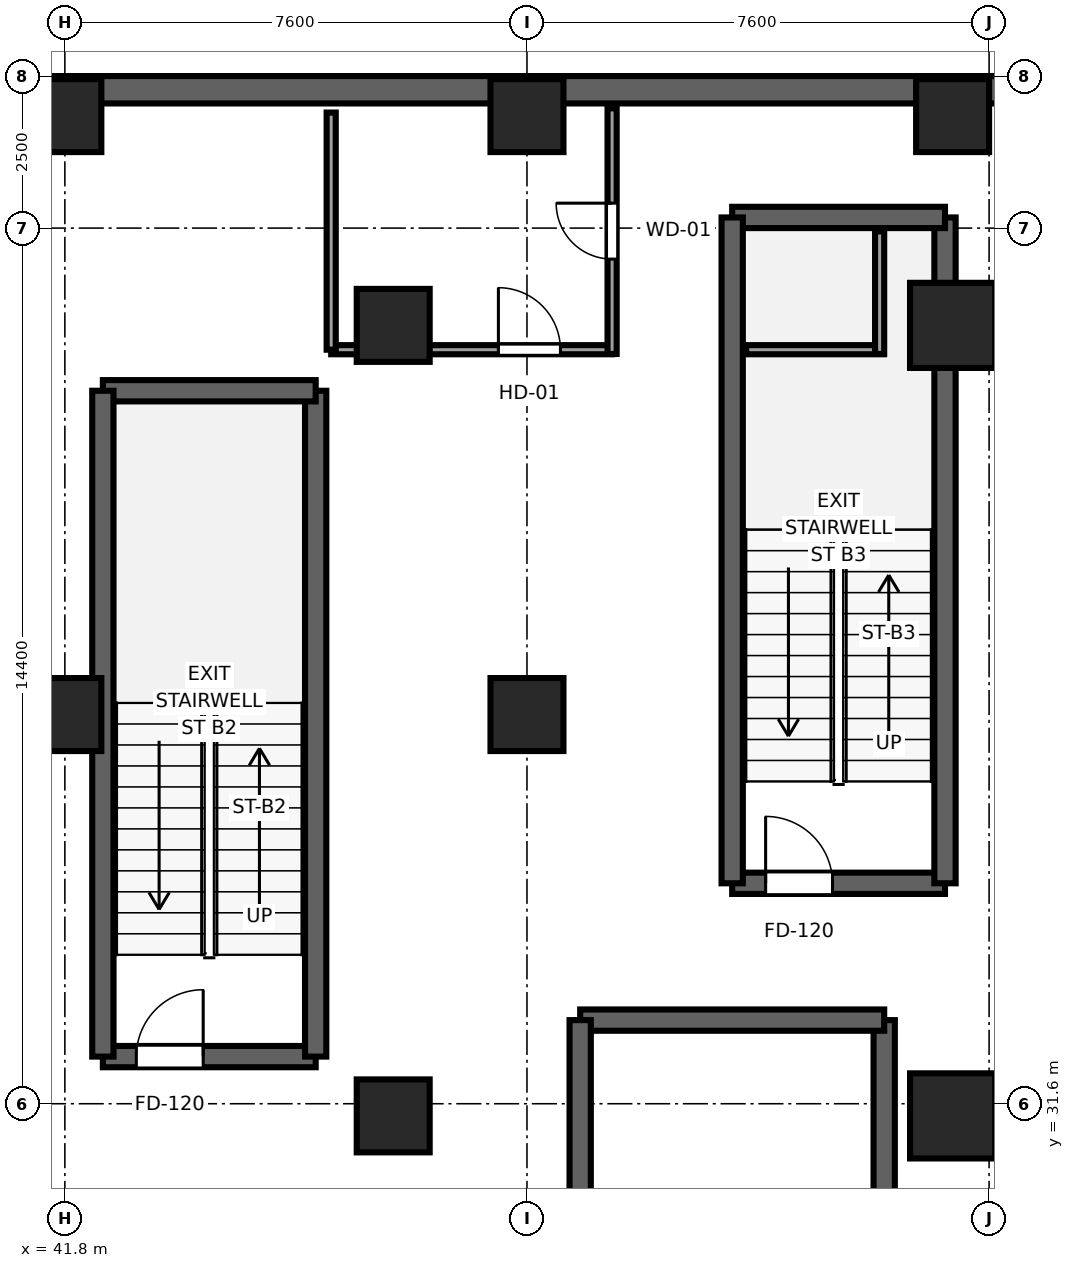
"""IFC4 building model, lengths in metres.
Left out: names, types, materials, properties, quantities, classifications, styles, units other than length and angle.
Written with IfcOpenShell. Run it as: python <this file> out.ifc"""

import sys

from ifc_helpers import new_model, si_unit, direction, frame, frame_2d, origin, origin_2d, place, context, subcontext, project, spatial, rectangle, extrude, source, transform, mapped, element, fill, save


model = new_model("IFC4")
c1 = context("Model", 3, precision=1e-05, world=origin(), true_north=direction((0.0, 1.0)))
c2 = subcontext(c1, "Body", "Model", "MODEL_VIEW")
j1 = project(units=[si_unit("LENGTHUNIT", "METRE"), si_unit("PLANEANGLEUNIT", "RADIAN")], contexts=[c1])
p1 = place(None, origin())
s1 = spatial("IfcSite", under=j1, at=p1, CompositionType="ELEMENT")
p2 = place(p1, origin())
s2 = spatial("IfcBuilding", under=s1, at=p2, CompositionType="ELEMENT")
p3 = place(p2, frame((0.0, 0.0, -4.8)))
s3 = spatial("IfcBuildingStorey", under=s2, at=p3, CompositionType="ELEMENT", Elevation=-4.8)
p4 = place(p3, frame((42.425, 32.375, 0.0), z_axis=(0.0, 0.0, 1.0), x_axis=(1.0, 0.0, 0.0)))
e1 = element("IfcWall", 1, at=p4, inside=s3, PredefinedType="SHEAR", context=c2, shape_type="SweptSolid", body=[
    extrude(rectangle(XDim=3.5, YDim=0.35, at=frame_2d((1.75, 0.0))), origin(), (0.0, 0.0, 1.0), 4.8),
])
p5 = place(p4, frame((0.55, 0.0, 0.0)))
e2 = element("IfcOpeningElement", 2, at=p5, cuts=e1, PredefinedType="OPENING", context=c2, shape_type="SweptSolid", body=[
    extrude(rectangle(XDim=1.1, YDim=2.12, at=frame_2d((0.55, 1.06))), frame((0.0, 0.185, 0.0), z_axis=(0.0, -1.0, 0.0), x_axis=(1.0, 0.0, 0.0)), (0.0, 0.0, 1.0), 0.37),
])
p6 = place(p3, frame((45.925, 32.375, 0.0), z_axis=(0.0, 0.0, 1.0), x_axis=(0.0, 1.0, 0.0)))
e3 = element("IfcWall", 3, at=p6, inside=s3, PredefinedType="SHEAR", context=c2, shape_type="SweptSolid", body=[
    extrude(rectangle(XDim=10.95, YDim=0.35, at=frame_2d((5.475, 0.0))), origin(), (0.0, 0.0, 1.0), 4.8),
])
p7 = place(p3, frame((45.925, 43.325, 0.0), z_axis=(0.0, 0.0, 1.0), x_axis=(-1.0, 0.0, 0.0)))
e4 = element("IfcWall", 4, at=p7, inside=s3, PredefinedType="SHEAR", context=c2, shape_type="SweptSolid", body=[
    extrude(rectangle(XDim=3.5, YDim=0.35, at=frame_2d((1.75, 0.0))), origin(), (0.0, 0.0, 1.0), 4.8),
])
p8 = place(p3, frame((42.425, 43.325, 0.0), z_axis=(0.0, 0.0, 1.0), x_axis=(0.0, -1.0, 0.0)))
e5 = element("IfcWall", 5, at=p8, inside=s3, PredefinedType="SHEAR", context=c2, shape_type="SweptSolid", body=[
    extrude(rectangle(XDim=10.95, YDim=0.35, at=frame_2d((5.475, 0.0))), origin(), (0.0, 0.0, 1.0), 4.8),
])
p9 = place(p3, frame((52.775, 35.225, 0.0), z_axis=(0.0, 0.0, 1.0), x_axis=(1.0, 0.0, 0.0)))
e6 = element("IfcWall", 6, at=p9, inside=s3, PredefinedType="SHEAR", context=c2, shape_type="SweptSolid", body=[
    extrude(rectangle(XDim=3.5, YDim=0.35, at=frame_2d((1.75, 0.0))), origin(), (0.0, 0.0, 1.0), 4.8),
])
p10 = place(p9, frame((0.55, 0.0, 0.0)))
e7 = element("IfcOpeningElement", 7, at=p10, cuts=e6, PredefinedType="OPENING", context=c2, shape_type="SweptSolid", body=[
    extrude(rectangle(XDim=1.1, YDim=2.12, at=frame_2d((0.55, 1.06))), frame((0.0, 0.185, 0.0), z_axis=(0.0, -1.0, 0.0), x_axis=(1.0, 0.0, 0.0)), (0.0, 0.0, 1.0), 0.37),
])
p11 = place(p3, frame((56.275, 35.225, 0.0), z_axis=(0.0, 0.0, 1.0), x_axis=(0.0, 1.0, 0.0)))
e8 = element("IfcWall", 8, at=p11, inside=s3, PredefinedType="SHEAR", context=c2, shape_type="SweptSolid", body=[
    extrude(rectangle(XDim=10.95, YDim=0.35, at=frame_2d((5.475, 0.0))), origin(), (0.0, 0.0, 1.0), 4.8),
])
p12 = place(p3, frame((56.275, 46.175, 0.0), z_axis=(0.0, 0.0, 1.0), x_axis=(-1.0, 0.0, 0.0)))
e9 = element("IfcWall", 9, at=p12, inside=s3, PredefinedType="SHEAR", context=c2, shape_type="SweptSolid", body=[
    extrude(rectangle(XDim=3.5, YDim=0.35, at=frame_2d((1.75, 0.0))), origin(), (0.0, 0.0, 1.0), 4.8),
])
p13 = place(p3, frame((52.775, 46.175, 0.0), z_axis=(0.0, 0.0, 1.0), x_axis=(0.0, -1.0, 0.0)))
e10 = element("IfcWall", 10, at=p13, inside=s3, PredefinedType="SHEAR", context=c2, shape_type="SweptSolid", body=[
    extrude(rectangle(XDim=10.95, YDim=0.35, at=frame_2d((5.475, 0.0))), origin(), (0.0, 0.0, 1.0), 4.8),
])
p14 = place(p3, frame((55.275, 20.025, 0.0), z_axis=(0.0, 0.0, 1.0), x_axis=(0.0, 1.0, 0.0)))
e11 = element("IfcWall", 11, at=p14, inside=s3, PredefinedType="SHEAR", context=c2, shape_type="SweptSolid", body=[
    extrude(rectangle(XDim=12.95, YDim=0.35, at=frame_2d((6.475, 0.0))), origin(), (0.0, 0.0, 1.0), 4.8),
])
p15 = place(p3, frame((55.275, 32.975, 0.0), z_axis=(0.0, 0.0, 1.0), x_axis=(-1.0, 0.0, 0.0)))
e12 = element("IfcWall", 12, at=p15, inside=s3, PredefinedType="SHEAR", context=c2, shape_type="SweptSolid", body=[
    extrude(rectangle(XDim=5.0, YDim=0.35, at=frame_2d((2.5, 0.0))), origin(), (0.0, 0.0, 1.0), 4.8),
])
p16 = place(p3, frame((50.275, 32.975, 0.0), z_axis=(0.0, 0.0, 1.0), x_axis=(0.0, -1.0, 0.0)))
e13 = element("IfcWall", 13, at=p16, inside=s3, PredefinedType="SHEAR", context=c2, shape_type="SweptSolid", body=[
    extrude(rectangle(XDim=12.95, YDim=0.35, at=frame_2d((6.475, 0.0))), origin(), (0.0, 0.0, 1.0), 4.8),
])
p17 = place(p3, frame((-8.4, 48.275, 0.0), z_axis=(0.0, 0.0, 1.0), x_axis=(1.0, 0.0, 0.0)))
e14 = element("IfcWall", 14, at=p17, inside=s3, PredefinedType="SOLIDWALL", context=c2, shape_type="SweptSolid", body=[
    extrude(rectangle(XDim=73.8, YDim=0.45, at=frame_2d((36.9, 0.0))), origin(), (0.0, 0.0, 1.0), 4.8),
])
m1 = source(origin(), c2, "Body", "SweptSolid", [
    extrude(rectangle(XDim=1.2, YDim=1.2, at=origin_2d()), origin(), (0.0, 0.0, 1.0), 4.8),
])
p18 = place(p3, frame((47.2, 31.4, 0.0), z_axis=(0.0, 0.0, 1.0), x_axis=(1.0, 0.0, 0.0)))
e15 = element("IfcColumn", 15, at=p18, inside=s3, PredefinedType="COLUMN", context=c2, shape_type="MappedRepresentation", body=[
    mapped(m1, transform((0.0, 0.0, 0.0), x_axis=(1.0, 0.0, 0.0), y_axis=(0.0, 1.0, 0.0), z_axis=(0.0, 0.0, 1.0), scale=1.0)),
])
m2 = source(origin(), c2, "Body", "SweptSolid", [
    extrude(rectangle(XDim=1.4, YDim=1.4, at=origin_2d()), origin(), (0.0, 0.0, 1.0), 4.8),
])
p19 = place(p3, frame((56.4, 31.4, 0.0), z_axis=(0.0, 0.0, 1.0), x_axis=(1.0, 0.0, 0.0)))
e16 = element("IfcColumn", 16, at=p19, inside=s3, PredefinedType="COLUMN", context=c2, shape_type="MappedRepresentation", body=[
    mapped(m2, transform((0.0, 0.0, 0.0), x_axis=(1.0, 0.0, 0.0), y_axis=(0.0, 1.0, 0.0), z_axis=(0.0, 0.0, 1.0), scale=1.0)),
])
p20 = place(p3, frame((47.2, 44.4, 0.0), z_axis=(0.0, 0.0, 1.0), x_axis=(1.0, 0.0, 0.0)))
e17 = element("IfcColumn", 17, at=p20, inside=s3, PredefinedType="COLUMN", context=c2, shape_type="MappedRepresentation", body=[
    mapped(m1, transform((0.0, 0.0, 0.0), x_axis=(1.0, 0.0, 0.0), y_axis=(0.0, 1.0, 0.0), z_axis=(0.0, 0.0, 1.0), scale=1.0)),
])
p21 = place(p3, frame((56.4, 44.4, 0.0), z_axis=(0.0, 0.0, 1.0), x_axis=(1.0, 0.0, 0.0)))
e18 = element("IfcColumn", 18, at=p21, inside=s3, PredefinedType="COLUMN", context=c2, shape_type="MappedRepresentation", body=[
    mapped(m2, transform((0.0, 0.0, 0.0), x_axis=(1.0, 0.0, 0.0), y_axis=(0.0, 1.0, 0.0), z_axis=(0.0, 0.0, 1.0), scale=1.0)),
])
for number, where, z_axis, x_axis in (
    (19, (41.8, 47.85, 0.0), (0.0, 0.0, 1.0), (1.0, 0.0, 0.0)),
    (20, (49.4, 47.85, 0.0), (0.0, 0.0, 1.0), (1.0, 0.0, 0.0)),
    (21, (56.4, 47.85, 0.0), (0.0, 0.0, 1.0), (1.0, 0.0, 0.0)),
    (22, (41.8, 38.0, 0.0), (0.0, 0.0, 1.0), (1.0, 0.0, 0.0)),
    (23, (49.4, 38.0, 0.0), (0.0, 0.0, 1.0), (1.0, 0.0, 0.0)),
):
    element("IfcColumn", number, at=place(p3, frame(where, z_axis=z_axis, x_axis=x_axis)), inside=s3, PredefinedType="COLUMN", context=c2, shape_type="MappedRepresentation", body=[
        mapped(m1, transform((0.0, 0.0, 0.0), x_axis=(1.0, 0.0, 0.0), y_axis=(0.0, 1.0, 0.0), z_axis=(0.0, 0.0, 1.0), scale=1.0)),
    ])
p22 = place(p3, frame((46.18, 44.0, 0.0), z_axis=(0.0, 0.0, 1.0), x_axis=(1.0, 0.0, 0.0)))
e24 = element("IfcWall", 24, at=p22, inside=s3, PredefinedType="PARTITIONING", context=c2, shape_type="SweptSolid", body=[
    extrude(rectangle(XDim=4.62, YDim=0.15, at=frame_2d((2.31, 0.0))), origin(), (0.0, 0.0, 1.0), 4.54),
])
p23 = place(p22, frame((2.75, 0.0, 0.0)))
e25 = element("IfcOpeningElement", 25, at=p23, cuts=e24, PredefinedType="OPENING", context=c2, shape_type="SweptSolid", body=[
    extrude(rectangle(XDim=1.02, YDim=2.03, at=frame_2d((0.51, 1.015))), frame((0.0, 0.085, 0.0), z_axis=(0.0, -1.0, 0.0), x_axis=(1.0, 0.0, 0.0)), (0.0, 0.0, 1.0), 0.17),
])
p24 = place(p3, frame((46.18, 44.0, 0.0), z_axis=(0.0, 0.0, 1.0), x_axis=(0.0, 1.0, 0.0)))
e26 = element("IfcWall", 26, at=p24, inside=s3, PredefinedType="PARTITIONING", context=c2, shape_type="SweptSolid", body=[
    extrude(rectangle(XDim=3.9, YDim=0.15, at=frame_2d((1.95, 0.0))), origin(), (0.0, 0.0, 1.0), 4.54),
])
p25 = place(p3, frame((50.8, 43.93, 0.0), z_axis=(0.0, 0.0, 1.0), x_axis=(0.0, 1.0, 0.0)))
e27 = element("IfcWall", 27, at=p25, inside=s3, PredefinedType="PARTITIONING", context=c2, shape_type="SweptSolid", body=[
    extrude(rectangle(XDim=4.04, YDim=0.15, at=frame_2d((2.02, 0.0))), origin(), (0.0, 0.0, 1.0), 4.54),
])
p26 = place(p25, frame((1.56, 0.0, 0.0)))
e28 = element("IfcOpeningElement", 28, at=p26, cuts=e27, PredefinedType="OPENING", context=c2, shape_type="SweptSolid", body=[
    extrude(rectangle(XDim=0.92, YDim=2.01, at=frame_2d((0.46, 1.005))), frame((0.0, 0.085, 0.0), z_axis=(0.0, -1.0, 0.0), x_axis=(1.0, 0.0, 0.0)), (0.0, 0.0, 1.0), 0.17),
])
p27 = place(p3, frame((53.005, 44.0, 0.0), z_axis=(0.0, 0.0, 1.0), x_axis=(1.0, 0.0, 0.0)))
e29 = element("IfcWall", 29, at=p27, inside=s3, PredefinedType="PARTITIONING", context=c2, shape_type="SweptSolid", body=[
    extrude(rectangle(XDim=2.265, YDim=0.15, at=frame_2d((1.133, 0.0))), origin(), (0.0, 0.0, 1.0), 4.54),
])
p28 = place(p3, frame((55.2, 43.93, 0.0), z_axis=(0.0, 0.0, 1.0), x_axis=(0.0, 1.0, 0.0)))
e30 = element("IfcWall", 30, at=p28, inside=s3, PredefinedType="PARTITIONING", context=c2, shape_type="SweptSolid", body=[
    extrude(rectangle(XDim=2.015, YDim=0.15, at=frame_2d((1.008, 0.0))), origin(), (0.0, 0.0, 1.0), 4.54),
])
m3 = source(origin(), c2, "Body", "SweptSolid", [
    extrude(rectangle(XDim=1.1, YDim=2.12, at=frame_2d((0.55, 1.06))), frame((0.0, 0.025, 0.0), z_axis=(0.0, -1.0, 0.0), x_axis=(1.0, 0.0, 0.0)), (0.0, 0.0, 1.0), 0.05),
])
p29 = place(p5, origin())
e31 = element("IfcDoor", 31, at=p29, inside=s3, OperationType="SINGLE_SWING_RIGHT", PredefinedType="DOOR", context=c2, shape_type="MappedRepresentation", body=[
    mapped(m3, transform((0.0, 0.0, 0.0), x_axis=(1.0, 0.0, 0.0), y_axis=(0.0, 1.0, 0.0), z_axis=(0.0, 0.0, 1.0), scale=1.0)),
])
fill(e2, e31)
p30 = place(p10, origin())
e32 = element("IfcDoor", 32, at=p30, inside=s3, OperationType="SINGLE_SWING_LEFT", PredefinedType="DOOR", context=c2, shape_type="MappedRepresentation", body=[
    mapped(m3, transform((0.0, 0.0, 0.0), x_axis=(1.0, 0.0, 0.0), y_axis=(0.0, 1.0, 0.0), z_axis=(0.0, 0.0, 1.0), scale=1.0)),
])
fill(e7, e32)
m4 = source(origin(), c2, "Body", "SweptSolid", [
    extrude(rectangle(XDim=1.02, YDim=2.03, at=frame_2d((0.51, 1.015))), frame((0.0, 0.025, 0.0), z_axis=(0.0, -1.0, 0.0), x_axis=(1.0, 0.0, 0.0)), (0.0, 0.0, 1.0), 0.05),
])
p31 = place(p23, origin())
e33 = element("IfcDoor", 33, at=p31, inside=s3, OperationType="SINGLE_SWING_LEFT", PredefinedType="DOOR", context=c2, shape_type="MappedRepresentation", body=[
    mapped(m4, transform((0.0, 0.0, 0.0), x_axis=(1.0, 0.0, 0.0), y_axis=(0.0, 1.0, 0.0), z_axis=(0.0, 0.0, 1.0), scale=1.0)),
])
fill(e25, e33)
m5 = source(origin(), c2, "Body", "SweptSolid", [
    extrude(rectangle(XDim=0.92, YDim=2.01, at=frame_2d((0.46, 1.005))), frame((0.0, 0.025, 0.0), z_axis=(0.0, -1.0, 0.0), x_axis=(1.0, 0.0, 0.0)), (0.0, 0.0, 1.0), 0.05),
])
p32 = place(p26, origin())
e34 = element("IfcDoor", 34, at=p32, inside=s3, OperationType="SINGLE_SWING_RIGHT", PredefinedType="DOOR", context=c2, shape_type="MappedRepresentation", body=[
    mapped(m5, transform((0.0, 0.0, 0.0), x_axis=(1.0, 0.0, 0.0), y_axis=(0.0, 1.0, 0.0), z_axis=(0.0, 0.0, 1.0), scale=1.0)),
])
fill(e28, e34)
save(model, sys.argv[1])
